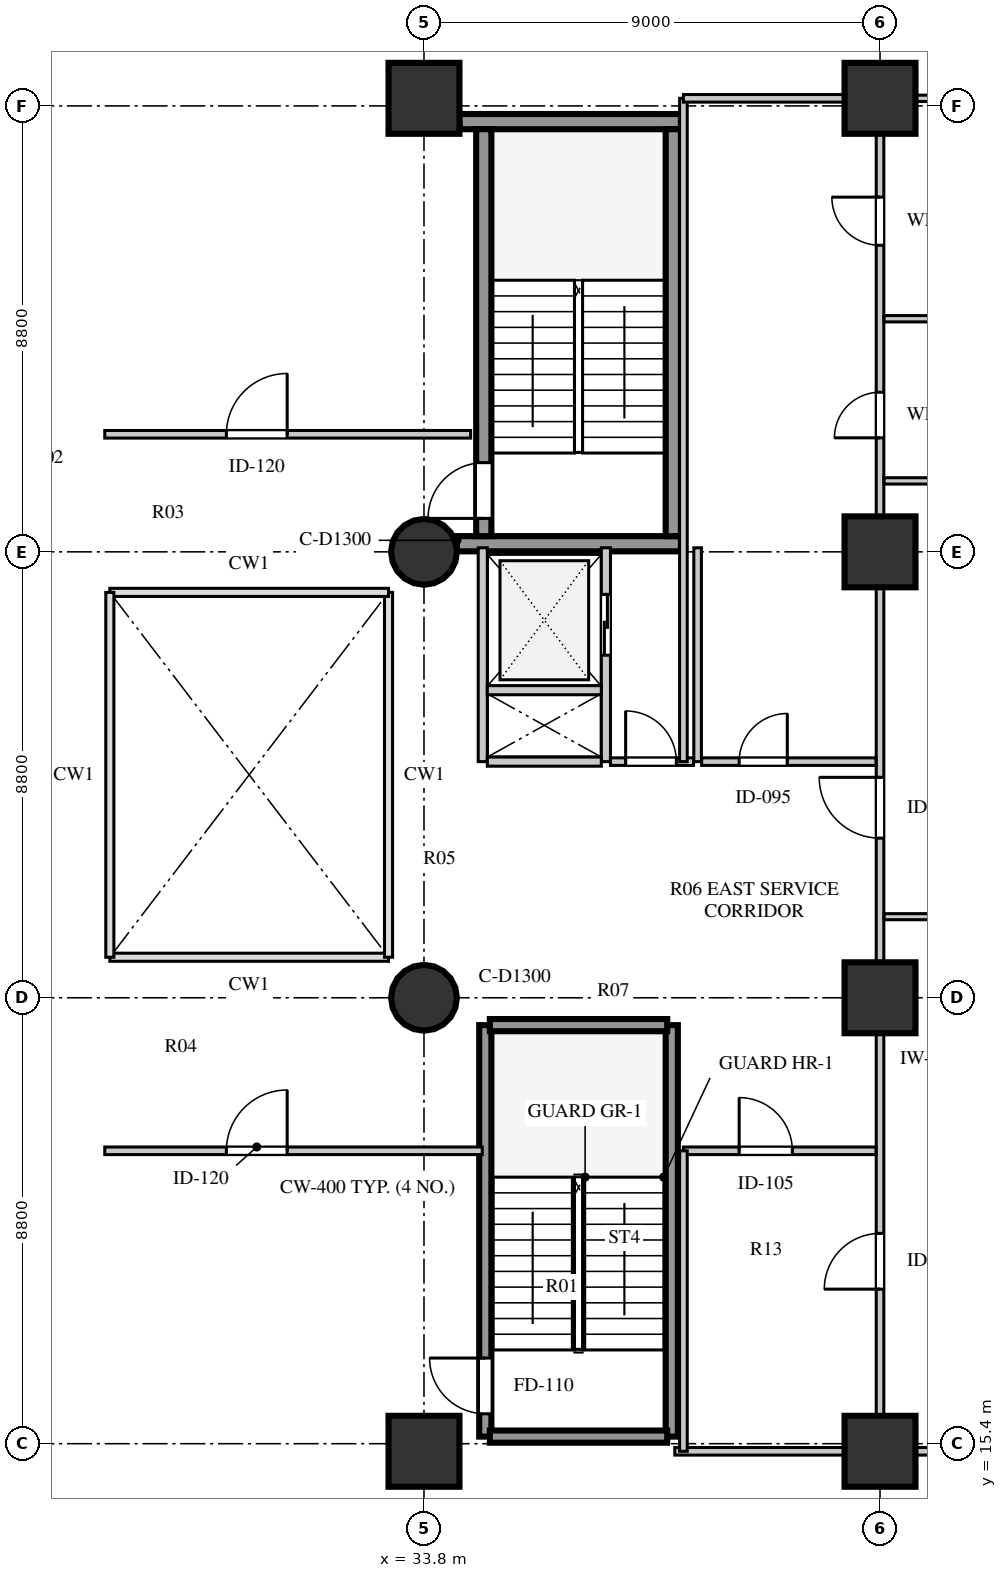
"""IFC4 building model, lengths in metres.
Left out: names, types, materials, properties, quantities, classifications, styles, units other than length and angle.
Written with IfcOpenShell. Run it as: python <this file> out.ifc"""

import sys

from ifc_helpers import new_model, si_unit, direction, frame, frame_2d, origin, origin_2d, place, context, subcontext, project, spatial, rectangle, circle, extrude, element, fill, save


model = new_model("IFC4")
c1 = context("Model", 3, precision=1e-05, world=origin(), true_north=direction((0.0, 1.0)))
c2 = subcontext(c1, "Body", "Model", "MODEL_VIEW")
j1 = project(units=[si_unit("LENGTHUNIT", "METRE"), si_unit("PLANEANGLEUNIT", "RADIAN")], contexts=[c1])
p1 = place(None, origin())
s1 = spatial("IfcSite", under=j1, at=p1, CompositionType="ELEMENT")
p2 = place(p1, origin())
s2 = spatial("IfcBuilding", under=s1, at=p2, CompositionType="ELEMENT")
p3 = place(p2, frame((0.0, 0.0, 12.5)))
s3 = spatial("IfcBuildingStorey", under=s2, at=p3, CompositionType="ELEMENT", Elevation=12.5)
p4 = place(p3, frame((34.45, 33.16, 0.0), z_axis=(0.0, 0.0, 1.0), x_axis=(1.0, 0.0, 0.0)))
e1 = element("IfcWall", 1, at=p4, inside=s3, PredefinedType="SHEAR", context=c2, shape_type="SweptSolid", body=[
    extrude(rectangle(XDim=4.42, YDim=0.3, at=frame_2d((2.21, 0.0))), origin(), (0.0, 0.0, 1.0), 4.22),
])
p5 = place(p3, frame((34.5, 41.49, 0.0), z_axis=(0.0, 0.0, 1.0), x_axis=(1.0, 0.0, 0.0)))
e2 = element("IfcWall", 2, at=p5, inside=s3, PredefinedType="SHEAR", context=c2, shape_type="SweptSolid", body=[
    extrude(rectangle(XDim=4.37, YDim=0.3, at=frame_2d((2.185, 0.0))), origin(), (0.0, 0.0, 1.0), 4.22),
])
p6 = place(p3, frame((34.98, 33.31, 0.0), z_axis=(0.0, 0.0, 1.0), x_axis=(0.0, 1.0, 0.0)))
e3 = element("IfcWall", 3, at=p6, inside=s3, PredefinedType="SHEAR", context=c2, shape_type="SweptSolid", body=[
    extrude(rectangle(XDim=8.03, YDim=0.3, at=frame_2d((4.015, 0.0))), origin(), (0.0, 0.0, 1.0), 4.22),
])
p7 = place(p6, frame((0.35, 0.0, 0.0)))
e4 = element("IfcOpeningElement", 4, at=p7, cuts=e3, PredefinedType="OPENING", context=c2, shape_type="SweptSolid", body=[
    extrude(rectangle(XDim=1.1, YDim=2.1, at=frame_2d((0.55, 1.05))), frame((0.0, 0.16, 0.0), z_axis=(0.0, -1.0, 0.0), x_axis=(1.0, 0.0, 0.0)), (0.0, 0.0, 1.0), 0.32),
])
p8 = place(p3, frame((38.72, 33.31, 0.0), z_axis=(0.0, 0.0, 1.0), x_axis=(0.0, 1.0, 0.0)))
e5 = element("IfcWall", 5, at=p8, inside=s3, PredefinedType="SHEAR", context=c2, shape_type="SweptSolid", body=[
    extrude(rectangle(XDim=8.03, YDim=0.3, at=frame_2d((4.015, 0.0))), origin(), (0.0, 0.0, 1.0), 4.22),
])
p9 = place(p3, frame((33.8, 15.25, 0.0), z_axis=(0.0, 0.0, 1.0), x_axis=(1.0, 0.0, 0.0)))
e6 = element("IfcColumn", 6, at=p9, inside=s3, PredefinedType="COLUMN", context=c2, shape_type="SweptSolid", body=[
    extrude(rectangle(XDim=1.4, YDim=1.4, at=origin_2d()), origin(), (0.0, 0.0, 1.0), 4.22),
])
for number, where, z_axis, x_axis in (
    (7, (33.8, 24.2, 0.0), (0.0, 0.0, 1.0), (1.0, 0.0, 0.0)),
    (8, (33.8, 33.0, 0.0), (0.0, 0.0, 1.0), (1.0, 0.0, 0.0)),
):
    element("IfcColumn", number, at=place(p3, frame(where, z_axis=z_axis, x_axis=x_axis)), inside=s3, PredefinedType="COLUMN", context=c2, shape_type="SweptSolid", body=[
        extrude(circle(Radius=0.65, at=origin_2d()), origin(), (0.0, 0.0, 1.0), 4.22),
    ])
for number, where, z_axis, x_axis in (
    (9, (33.8, 41.95, 0.0), (0.0, 0.0, 1.0), (1.0, 0.0, 0.0)),
    (10, (42.8, 15.25, 0.0), (0.0, 0.0, 1.0), (1.0, 0.0, 0.0)),
    (11, (42.8, 24.2, 0.0), (0.0, 0.0, 1.0), (1.0, 0.0, 0.0)),
    (12, (42.8, 33.0, 0.0), (0.0, 0.0, 1.0), (1.0, 0.0, 0.0)),
    (13, (42.8, 41.95, 0.0), (0.0, 0.0, 1.0), (1.0, 0.0, 0.0)),
):
    element("IfcColumn", number, at=place(p3, frame(where, z_axis=z_axis, x_axis=x_axis)), inside=s3, PredefinedType="COLUMN", context=c2, shape_type="SweptSolid", body=[
        extrude(rectangle(XDim=1.4, YDim=1.4, at=origin_2d()), origin(), (0.0, 0.0, 1.0), 4.22),
    ])
p10 = place(p3, frame((34.96, 28.86, 0.0), z_axis=(0.0, 0.0, 1.0), x_axis=(0.0, 1.0, 0.0)))
e14 = element("IfcWall", 14, at=p10, inside=s3, PredefinedType="SOLIDWALL", context=c2, shape_type="SweptSolid", body=[
    extrude(rectangle(XDim=4.22, YDim=0.18, at=frame_2d((2.11, 0.0))), origin(), (0.0, 0.0, 1.0), 4.22),
])
p11 = place(p3, frame((37.39, 28.86, 0.0), z_axis=(0.0, 0.0, 1.0), x_axis=(0.0, 1.0, 0.0)))
e15 = element("IfcWall", 15, at=p11, inside=s3, PredefinedType="SOLIDWALL", context=c2, shape_type="SweptSolid", body=[
    extrude(rectangle(XDim=4.22, YDim=0.18, at=frame_2d((2.11, 0.0))), origin(), (0.0, 0.0, 1.0), 4.22),
])
p12 = place(p11, frame((2.1, 0.0, 0.0)))
e16 = element("IfcOpeningElement", 16, at=p12, cuts=e15, PredefinedType="OPENING", context=c2, shape_type="SweptSolid", body=[
    extrude(rectangle(XDim=1.2, YDim=2.12, at=frame_2d((0.6, 1.06))), frame((0.0, 0.1, 0.0), z_axis=(0.0, -1.0, 0.0), x_axis=(1.0, 0.0, 0.0)), (0.0, 0.0, 1.0), 0.2),
])
for number, where, z_axis, x_axis in (
    (17, (35.05, 28.86, 0.0), (0.0, 0.0, 1.0), (1.0, 0.0, 0.0)),
    (18, (35.05, 30.27, 0.0), (0.0, 0.0, 1.0), (1.0, 0.0, 0.0)),
):
    element("IfcWall", number, at=place(p3, frame(where, z_axis=z_axis, x_axis=x_axis)), inside=s3, PredefinedType="SOLIDWALL", context=c2, shape_type="SweptSolid", body=[
        extrude(rectangle(XDim=2.25, YDim=0.18, at=frame_2d((1.125, 0.0))), origin(), (0.0, 0.0, 1.0), 4.22),
    ])
p13 = place(p3, frame((39.2, 28.86, 0.0), z_axis=(0.0, 0.0, 1.0), x_axis=(0.0, 1.0, 0.0)))
e19 = element("IfcWall", 19, at=p13, inside=s3, PredefinedType="PARTITIONING", context=c2, shape_type="SweptSolid", body=[
    extrude(rectangle(XDim=4.22, YDim=0.15, at=frame_2d((2.11, 0.0))), origin(), (0.0, 0.0, 1.0), 4.22),
])
p14 = place(p3, frame((37.48, 28.86, 0.0), z_axis=(0.0, 0.0, 1.0), x_axis=(1.0, 0.0, 0.0)))
e20 = element("IfcWall", 20, at=p14, inside=s3, PredefinedType="PARTITIONING", context=c2, shape_type="SweptSolid", body=[
    extrude(rectangle(XDim=1.64, YDim=0.15, at=frame_2d((0.82, 0.0))), origin(), (0.0, 0.0, 1.0), 4.22),
])
p15 = place(p14, frame((0.3, 0.0, 0.0)))
e21 = element("IfcOpeningElement", 21, at=p15, cuts=e20, PredefinedType="OPENING", context=c2, shape_type="SweptSolid", body=[
    extrude(rectangle(XDim=1.0, YDim=2.1, at=frame_2d((0.5, 1.05))), frame((0.0, 0.085, 0.0), z_axis=(0.0, -1.0, 0.0), x_axis=(1.0, 0.0, 0.0)), (0.0, 0.0, 1.0), 0.17),
])
p16 = place(p3, frame((35.01, 15.54, 0.0), z_axis=(0.0, 0.0, 1.0), x_axis=(0.0, 1.0, 0.0)))
e22 = element("IfcWall", 22, at=p16, inside=s3, PredefinedType="SHEAR", context=c2, shape_type="SweptSolid", body=[
    extrude(rectangle(XDim=8.12, YDim=0.24, at=frame_2d((4.06, 0.0))), origin(), (0.0, 0.0, 1.0), 4.5),
])
p17 = place(p16, frame((0.45, 0.0, 0.0)))
e23 = element("IfcOpeningElement", 23, at=p17, cuts=e22, PredefinedType="OPENING", context=c2, shape_type="SweptSolid", body=[
    extrude(rectangle(XDim=1.1, YDim=2.1, at=frame_2d((0.55, 1.05))), frame((0.0, 0.13, 0.0), z_axis=(0.0, -1.0, 0.0), x_axis=(1.0, 0.0, 0.0)), (0.0, 0.0, 1.0), 0.26),
])
p18 = place(p3, frame((38.69, 15.54, 0.0), z_axis=(0.0, 0.0, 1.0), x_axis=(0.0, 1.0, 0.0)))
e24 = element("IfcWall", 24, at=p18, inside=s3, PredefinedType="SHEAR", context=c2, shape_type="SweptSolid", body=[
    extrude(rectangle(XDim=8.12, YDim=0.24, at=frame_2d((4.06, 0.0))), origin(), (0.0, 0.0, 1.0), 4.5),
])
for number, where, z_axis, x_axis in (
    (25, (35.1, 15.54, 0.0), (0.0, 0.0, 1.0), (1.0, 0.0, 0.0)),
    (26, (35.1, 23.66, 0.0), (0.0, 0.0, 1.0), (1.0, 0.0, 0.0)),
):
    element("IfcWall", number, at=place(p3, frame(where, z_axis=z_axis, x_axis=x_axis)), inside=s3, PredefinedType="SHEAR", context=c2, shape_type="SweptSolid", body=[
        extrude(rectangle(XDim=3.5, YDim=0.24, at=frame_2d((1.75, 0.0))), origin(), (0.0, 0.0, 1.0), 4.5),
    ])
p19 = place(p3, frame((27.5, 21.18, 0.0), z_axis=(0.0, 0.0, 1.0), x_axis=(1.0, 0.0, 0.0)))
e27 = element("IfcWall", 27, at=p19, inside=s3, PredefinedType="PARTITIONING", context=c2, shape_type="SweptSolid", body=[
    extrude(rectangle(XDim=7.45, YDim=0.15, at=frame_2d((3.725, 0.0))), origin(), (0.0, 0.0, 1.0), 3.82),
])
p20 = place(p19, frame((2.4, 0.0, 0.0)))
e28 = element("IfcOpeningElement", 28, at=p20, cuts=e27, PredefinedType="OPENING", context=c2, shape_type="SweptSolid", body=[
    extrude(rectangle(XDim=1.2, YDim=2.1, at=frame_2d((0.6, 1.05))), frame((0.0, 0.085, 0.0), z_axis=(0.0, -1.0, 0.0), x_axis=(1.0, 0.0, 0.0)), (0.0, 0.0, 1.0), 0.17),
])
p21 = place(p3, frame((27.5, 35.32, 0.0), z_axis=(0.0, 0.0, 1.0), x_axis=(1.0, 0.0, 0.0)))
e29 = element("IfcWall", 29, at=p21, inside=s3, PredefinedType="PARTITIONING", context=c2, shape_type="SweptSolid", body=[
    extrude(rectangle(XDim=7.22, YDim=0.15, at=frame_2d((3.61, 0.0))), origin(), (0.0, 0.0, 1.0), 4.22),
])
p22 = place(p21, frame((2.4, 0.0, 0.0)))
e30 = element("IfcOpeningElement", 30, at=p22, cuts=e29, PredefinedType="OPENING", context=c2, shape_type="SweptSolid", body=[
    extrude(rectangle(XDim=1.2, YDim=2.1, at=frame_2d((0.6, 1.05))), frame((0.0, 0.085, 0.0), z_axis=(0.0, -1.0, 0.0), x_axis=(1.0, 0.0, 0.0)), (0.0, 0.0, 1.0), 0.17),
])
p23 = place(p3, frame((42.8, 15.25, 0.0), z_axis=(0.0, 0.0, 1.0), x_axis=(0.0, 1.0, 0.0)))
e31 = element("IfcWall", 31, at=p23, inside=s3, PredefinedType="PARTITIONING", context=c2, shape_type="SweptSolid", body=[
    extrude(rectangle(XDim=26.7, YDim=0.15, at=frame_2d((13.35, 0.0))), origin(), (0.0, 0.0, 1.0), 3.42),
])
p24 = place(p23, frame((3.2, 0.0, 0.0)))
e32 = element("IfcOpeningElement", 32, at=p24, cuts=e31, PredefinedType="OPENING", context=c2, shape_type="SweptSolid", body=[
    extrude(rectangle(XDim=1.1, YDim=2.08, at=frame_2d((0.55, 1.04))), frame((0.0, 0.085, 0.0), z_axis=(0.0, -1.0, 0.0), x_axis=(1.0, 0.0, 0.0)), (0.0, 0.0, 1.0), 0.17),
])
p25 = place(p23, frame((12.1, 0.0, 0.0)))
e33 = element("IfcOpeningElement", 33, at=p25, cuts=e31, PredefinedType="OPENING", context=c2, shape_type="SweptSolid", body=[
    extrude(rectangle(XDim=1.2, YDim=2.1, at=frame_2d((0.6, 1.05))), frame((0.0, 0.085, 0.0), z_axis=(0.0, -1.0, 0.0), x_axis=(1.0, 0.0, 0.0)), (0.0, 0.0, 1.0), 0.17),
])
p26 = place(p23, frame((20.0, 0.0, 0.0)))
e34 = element("IfcOpeningElement", 34, at=p26, cuts=e31, PredefinedType="OPENING", context=c2, shape_type="SweptSolid", body=[
    extrude(rectangle(XDim=0.9, YDim=2.05, at=frame_2d((0.45, 1.025))), frame((0.0, 0.085, 0.0), z_axis=(0.0, -1.0, 0.0), x_axis=(1.0, 0.0, 0.0)), (0.0, 0.0, 1.0), 0.17),
])
p27 = place(p23, frame((23.8, 0.0, 0.0)))
e35 = element("IfcOpeningElement", 35, at=p27, cuts=e31, PredefinedType="OPENING", context=c2, shape_type="SweptSolid", body=[
    extrude(rectangle(XDim=0.95, YDim=2.05, at=frame_2d((0.475, 1.025))), frame((0.0, 0.085, 0.0), z_axis=(0.0, -1.0, 0.0), x_axis=(1.0, 0.0, 0.0)), (0.0, 0.0, 1.0), 0.17),
])
p28 = place(p3, frame((38.75, 15.25, 0.0), z_axis=(0.0, 0.0, 1.0), x_axis=(1.0, 0.0, 0.0)))
e36 = element("IfcWall", 36, at=p28, inside=s3, PredefinedType="PARTITIONING", context=c2, shape_type="SweptSolid", body=[
    extrude(rectangle(XDim=12.7, YDim=0.15, at=frame_2d((6.35, 0.0))), origin(), (0.0, 0.0, 1.0), 3.42),
])
p29 = place(p3, frame((42.88, 41.95, 0.0), z_axis=(0.0, 0.0, 1.0), x_axis=(1.0, 0.0, 0.0)))
e37 = element("IfcWall", 37, at=p29, inside=s3, PredefinedType="PLUMBINGWALL", context=c2, shape_type="SweptSolid", body=[
    extrude(rectangle(XDim=8.57, YDim=0.125, at=frame_2d((4.285, 0.0))), origin(), (0.0, 0.0, 1.0), 3.72),
])
p30 = place(p3, frame((38.92, 21.18, 0.0), z_axis=(0.0, 0.0, 1.0), x_axis=(1.0, 0.0, 0.0)))
e38 = element("IfcWall", 38, at=p30, inside=s3, PredefinedType="PARTITIONING", context=c2, shape_type="SweptSolid", body=[
    extrude(rectangle(XDim=3.8, YDim=0.15, at=frame_2d((1.9, 0.0))), origin(), (0.0, 0.0, 1.0), 4.22),
])
p31 = place(p30, frame((1.1, 0.0, 0.0)))
e39 = element("IfcOpeningElement", 39, at=p31, cuts=e38, PredefinedType="OPENING", context=c2, shape_type="SweptSolid", body=[
    extrude(rectangle(XDim=1.05, YDim=2.1, at=frame_2d((0.525, 1.05))), frame((0.0, 0.085, 0.0), z_axis=(0.0, -1.0, 0.0), x_axis=(1.0, 0.0, 0.0)), (0.0, 0.0, 1.0), 0.17),
])
p32 = place(p3, frame((38.92, 15.25, 0.0), z_axis=(0.0, 0.0, 1.0), x_axis=(0.0, 1.0, 0.0)))
e40 = element("IfcWall", 40, at=p32, inside=s3, PredefinedType="PARTITIONING", context=c2, shape_type="SweptSolid", body=[
    extrude(rectangle(XDim=5.93, YDim=0.15, at=frame_2d((2.965, 0.0))), origin(), (0.0, 0.0, 1.0), 4.22),
])
p33 = place(p3, frame((39.28, 28.86, 0.0), z_axis=(0.0, 0.0, 1.0), x_axis=(1.0, 0.0, 0.0)))
e41 = element("IfcWall", 41, at=p33, inside=s3, PredefinedType="PARTITIONING", context=c2, shape_type="SweptSolid", body=[
    extrude(rectangle(XDim=3.44, YDim=0.15, at=frame_2d((1.72, 0.0))), origin(), (0.0, 0.0, 1.0), 4.22),
])
p34 = place(p33, frame((0.74, 0.0, 0.0)))
e42 = element("IfcOpeningElement", 42, at=p34, cuts=e41, PredefinedType="OPENING", context=c2, shape_type="SweptSolid", body=[
    extrude(rectangle(XDim=0.95, YDim=2.08, at=frame_2d((0.475, 1.04))), frame((0.0, 0.085, 0.0), z_axis=(0.0, -1.0, 0.0), x_axis=(1.0, 0.0, 0.0)), (0.0, 0.0, 1.0), 0.17),
])
p35 = place(p3, frame((38.92, 28.86, 0.0), z_axis=(0.0, 0.0, 1.0), x_axis=(0.0, 1.0, 0.0)))
e43 = element("IfcWall", 43, at=p35, inside=s3, PredefinedType="PARTITIONING", context=c2, shape_type="SweptSolid", body=[
    extrude(rectangle(XDim=13.09, YDim=0.15, at=frame_2d((6.545, 0.0))), origin(), (0.0, 0.0, 1.0), 4.22),
])
p36 = place(p3, frame((38.92, 41.95, 0.0), z_axis=(0.0, 0.0, 1.0), x_axis=(1.0, 0.0, 0.0)))
e44 = element("IfcWall", 44, at=p36, inside=s3, PredefinedType="PARTITIONING", context=c2, shape_type="SweptSolid", body=[
    extrude(rectangle(XDim=3.88, YDim=0.15, at=frame_2d((1.94, 0.0))), origin(), (0.0, 0.0, 1.0), 3.42),
])
p37 = place(p3, frame((42.88, 25.8, 0.0), z_axis=(0.0, 0.0, 1.0), x_axis=(1.0, 0.0, 0.0)))
e45 = element("IfcWall", 45, at=p37, inside=s3, PredefinedType="PARTITIONING", context=c2, shape_type="SweptSolid", body=[
    extrude(rectangle(XDim=8.57, YDim=0.12, at=frame_2d((4.285, 0.0))), origin(), (0.0, 0.0, 1.0), 4.22),
])
for number, where, z_axis, x_axis in (
    (46, (42.88, 34.4, 0.0), (0.0, 0.0, 1.0), (1.0, 0.0, 0.0)),
    (47, (42.88, 37.6, 0.0), (0.0, 0.0, 1.0), (1.0, 0.0, 0.0)),
):
    element("IfcWall", number, at=place(p3, frame(where, z_axis=z_axis, x_axis=x_axis)), inside=s3, PredefinedType="PLUMBINGWALL", context=c2, shape_type="SweptSolid", body=[
        extrude(rectangle(XDim=8.57, YDim=0.125, at=frame_2d((4.285, 0.0))), origin(), (0.0, 0.0, 1.0), 4.22),
    ])
p38 = place(p7, origin())
e48 = element("IfcDoor", 48, at=p38, inside=s3, OperationType="SINGLE_SWING_LEFT", PredefinedType="DOOR", context=c2, shape_type="SweptSolid", body=[
    extrude(rectangle(XDim=1.1, YDim=2.1, at=frame_2d((0.55, 1.05))), frame((0.0, 0.025, 0.0), z_axis=(0.0, -1.0, 0.0), x_axis=(1.0, 0.0, 0.0)), (0.0, 0.0, 1.0), 0.05),
])
fill(e4, e48)
p39 = place(p12, frame((1.2, 0.0, 0.0), z_axis=(0.0, 0.0, 1.0), x_axis=(-1.0, 0.0, 0.0)))
e49 = element("IfcDoor", 49, at=p39, inside=s3, OperationType="DOUBLE_DOOR_SLIDING", PredefinedType="DOOR", context=c2, shape_type="SweptSolid", body=[
    extrude(rectangle(XDim=1.2, YDim=2.12, at=frame_2d((0.6, 1.06))), frame((0.0, 0.025, 0.0), z_axis=(0.0, -1.0, 0.0), x_axis=(1.0, 0.0, 0.0)), (0.0, 0.0, 1.0), 0.05),
])
fill(e16, e49)
p40 = place(p15, origin())
e50 = element("IfcDoor", 50, at=p40, inside=s3, OperationType="SINGLE_SWING_LEFT", PredefinedType="DOOR", context=c2, shape_type="SweptSolid", body=[
    extrude(rectangle(XDim=1.0, YDim=2.1, at=frame_2d((0.5, 1.05))), frame((0.0, 0.025, 0.0), z_axis=(0.0, -1.0, 0.0), x_axis=(1.0, 0.0, 0.0)), (0.0, 0.0, 1.0), 0.05),
])
fill(e21, e50)
p41 = place(p17, origin())
e51 = element("IfcDoor", 51, at=p41, inside=s3, OperationType="SINGLE_SWING_RIGHT", PredefinedType="DOOR", context=c2, shape_type="SweptSolid", body=[
    extrude(rectangle(XDim=1.1, YDim=2.1, at=frame_2d((0.55, 1.05))), frame((0.0, 0.025, 0.0), z_axis=(0.0, -1.0, 0.0), x_axis=(1.0, 0.0, 0.0)), (0.0, 0.0, 1.0), 0.05),
])
fill(e23, e51)
p42 = place(p31, origin())
e52 = element("IfcDoor", 52, at=p42, inside=s3, OperationType="SINGLE_SWING_LEFT", PredefinedType="DOOR", context=c2, shape_type="SweptSolid", body=[
    extrude(rectangle(XDim=1.05, YDim=2.1, at=frame_2d((0.525, 1.05))), frame((0.0, 0.025, 0.0), z_axis=(0.0, -1.0, 0.0), x_axis=(1.0, 0.0, 0.0)), (0.0, 0.0, 1.0), 0.05),
])
fill(e39, e52)
p43 = place(p34, frame((0.95, 0.0, 0.0), z_axis=(0.0, 0.0, 1.0), x_axis=(-1.0, 0.0, 0.0)))
e53 = element("IfcDoor", 53, at=p43, inside=s3, OperationType="SINGLE_SWING_LEFT", PredefinedType="DOOR", context=c2, shape_type="SweptSolid", body=[
    extrude(rectangle(XDim=0.95, YDim=2.08, at=frame_2d((0.475, 1.04))), frame((0.0, 0.025, 0.0), z_axis=(0.0, -1.0, 0.0), x_axis=(1.0, 0.0, 0.0)), (0.0, 0.0, 1.0), 0.05),
])
fill(e42, e53)
p44 = place(p20, frame((1.2, 0.0, 0.0), z_axis=(0.0, 0.0, 1.0), x_axis=(-1.0, 0.0, 0.0)))
e54 = element("IfcDoor", 54, at=p44, inside=s3, OperationType="SINGLE_SWING_LEFT", PredefinedType="DOOR", context=c2, shape_type="SweptSolid", body=[
    extrude(rectangle(XDim=1.2, YDim=2.1, at=frame_2d((0.6, 1.05))), frame((0.0, 0.025, 0.0), z_axis=(0.0, -1.0, 0.0), x_axis=(1.0, 0.0, 0.0)), (0.0, 0.0, 1.0), 0.05),
])
fill(e28, e54)
p45 = place(p22, origin())
e55 = element("IfcDoor", 55, at=p45, inside=s3, OperationType="SINGLE_SWING_RIGHT", PredefinedType="DOOR", context=c2, shape_type="SweptSolid", body=[
    extrude(rectangle(XDim=1.2, YDim=2.1, at=frame_2d((0.6, 1.05))), frame((0.0, 0.025, 0.0), z_axis=(0.0, -1.0, 0.0), x_axis=(1.0, 0.0, 0.0)), (0.0, 0.0, 1.0), 0.05),
])
fill(e30, e55)
p46 = place(p24, origin())
e56 = element("IfcDoor", 56, at=p46, inside=s3, OperationType="SINGLE_SWING_LEFT", PredefinedType="DOOR", context=c2, shape_type="SweptSolid", body=[
    extrude(rectangle(XDim=1.1, YDim=2.08, at=frame_2d((0.55, 1.04))), frame((0.0, 0.025, 0.0), z_axis=(0.0, -1.0, 0.0), x_axis=(1.0, 0.0, 0.0)), (0.0, 0.0, 1.0), 0.05),
])
fill(e32, e56)
p47 = place(p25, origin())
e57 = element("IfcDoor", 57, at=p47, inside=s3, OperationType="SINGLE_SWING_RIGHT", PredefinedType="DOOR", context=c2, shape_type="SweptSolid", body=[
    extrude(rectangle(XDim=1.2, YDim=2.1, at=frame_2d((0.6, 1.05))), frame((0.0, 0.025, 0.0), z_axis=(0.0, -1.0, 0.0), x_axis=(1.0, 0.0, 0.0)), (0.0, 0.0, 1.0), 0.05),
])
fill(e33, e57)
p48 = place(p26, origin())
e58 = element("IfcDoor", 58, at=p48, inside=s3, OperationType="SINGLE_SWING_LEFT", PredefinedType="DOOR", context=c2, shape_type="SweptSolid", body=[
    extrude(rectangle(XDim=0.9, YDim=2.05, at=frame_2d((0.45, 1.025))), frame((0.0, 0.025, 0.0), z_axis=(0.0, -1.0, 0.0), x_axis=(1.0, 0.0, 0.0)), (0.0, 0.0, 1.0), 0.05),
])
fill(e34, e58)
p49 = place(p27, origin())
e59 = element("IfcDoor", 59, at=p49, inside=s3, OperationType="SINGLE_SWING_RIGHT", PredefinedType="DOOR", context=c2, shape_type="SweptSolid", body=[
    extrude(rectangle(XDim=0.95, YDim=2.05, at=frame_2d((0.475, 1.025))), frame((0.0, 0.025, 0.0), z_axis=(0.0, -1.0, 0.0), x_axis=(1.0, 0.0, 0.0)), (0.0, 0.0, 1.0), 0.05),
])
fill(e35, e59)
save(model, sys.argv[1])
